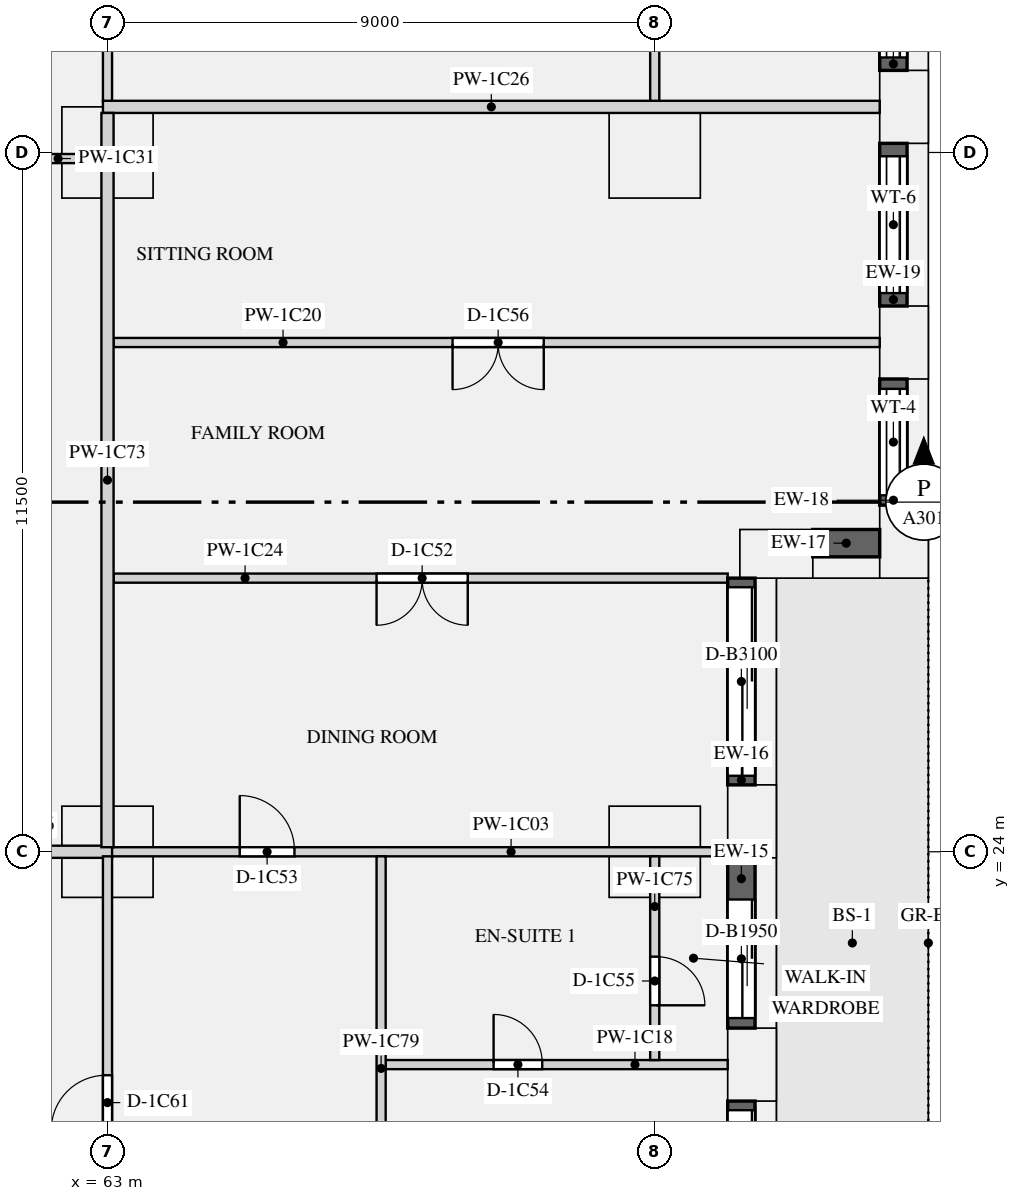
"""IFC4 building model, lengths in metres.
Left out: names, types, materials, properties, quantities, classifications, styles, units other than length and angle.
Written with IfcOpenShell. Run it as: python <this file> out.ifc"""

import sys

from ifc_helpers import new_model, si_unit, direction, frame, frame_2d, origin, origin_2d, place, context, subcontext, project, spatial, rectangle, extrude, element, fill, save


model = new_model("IFC4")
c1 = context("Model", 3, precision=1e-05, world=origin(), true_north=direction((0.0, 1.0)))
c2 = subcontext(c1, "Body", "Model", "MODEL_VIEW")
j1 = project(units=[si_unit("LENGTHUNIT", "METRE"), si_unit("PLANEANGLEUNIT", "RADIAN")], contexts=[c1])
p1 = place(None, origin())
s1 = spatial("IfcSite", under=j1, at=p1, CompositionType="ELEMENT")
p2 = place(p1, origin())
s2 = spatial("IfcBuilding", under=s1, at=p2, CompositionType="ELEMENT")
p3 = place(p2, frame((0.0, 0.0, 38.4)))
s3 = spatial("IfcBuildingStorey", under=s2, at=p3, CompositionType="ELEMENT", Elevation=38.4)
for number, where, z_axis, x_axis in (
    (1, (73.6, 20.5, 0.0), (0.0, 0.0, 1.0), (0.0, 1.0, 0.0)),
    (2, (73.6, 24.5, 0.0), (0.0, 0.0, 1.0), (0.0, 1.0, 0.0)),
    (3, (74.0, 28.9, 0.0), (0.0, 0.0, 1.0), (1.0, 0.0, 0.0)),
    (4, (76.1, 29.1, 0.0), (0.0, 0.0, 1.0), (0.0, 1.0, 0.0)),
    (5, (76.1, 32.375, 0.0), (0.0, 0.0, 1.0), (0.0, 1.0, 0.0)),
    (6, (76.1, 36.25, 0.0), (0.0, 0.0, 1.0), (0.0, 1.0, 0.0)),
):
    element("IfcColumn", number, at=place(p3, frame(where, z_axis=z_axis, x_axis=x_axis)), inside=s3, PredefinedType="USERDEFINED", context=c2, shape_type="SweptSolid", body=[
        extrude(rectangle(XDim=1.2, YDim=0.8, at=origin_2d()), origin(), (0.0, 0.0, 1.0), 3.15),
    ])
for number, where, z_axis, x_axis in (
    (7, (63.0, 24.0, 0.0), (0.0, 0.0, 1.0), (1.0, 0.0, 0.0)),
    (8, (72.0, 24.0, 0.0), (0.0, 0.0, 1.0), (1.0, 0.0, 0.0)),
    (9, (63.0, 35.5, 0.0), (0.0, 0.0, 1.0), (1.0, 0.0, 0.0)),
    (10, (72.0, 35.5, 0.0), (0.0, 0.0, 1.0), (1.0, 0.0, 0.0)),
):
    element("IfcColumn", number, at=place(p3, frame(where, z_axis=z_axis, x_axis=x_axis)), inside=s3, PredefinedType="COLUMN", context=c2, shape_type="SweptSolid", body=[
        extrude(rectangle(XDim=1.5, YDim=1.5, at=origin_2d()), origin(), (0.0, 0.0, 1.0), 3.15),
    ])
p4 = place(p3, frame((73.425, 17.1, 0.0), z_axis=(0.0, 0.0, 1.0), x_axis=(0.0, 1.0, 0.0)))
e11 = element("IfcWall", 11, at=p4, inside=s3, PredefinedType="SOLIDWALL", context=c2, shape_type="SweptSolid", body=[
    extrude(rectangle(XDim=2.8, YDim=0.45, at=frame_2d((1.4, 0.0))), origin(), (0.0, 0.0, 1.0), 2.83),
])
p5 = place(p4, frame((0.15, 0.0, 0.0)))
e12 = element("IfcOpeningElement", 12, at=p5, cuts=e11, PredefinedType="OPENING", context=c2, shape_type="SweptSolid", body=[
    extrude(rectangle(XDim=2.5, YDim=2.3, at=frame_2d((1.25, 1.15))), frame((0.0, 0.235, 0.0), z_axis=(0.0, -1.0, 0.0), x_axis=(1.0, 0.0, 0.0)), (0.0, 0.0, 1.0), 0.47),
])
p6 = place(p3, frame((73.425, 21.1, 0.0), z_axis=(0.0, 0.0, 1.0), x_axis=(0.0, 1.0, 0.0)))
e13 = element("IfcWall", 13, at=p6, inside=s3, PredefinedType="SOLIDWALL", context=c2, shape_type="SweptSolid", body=[
    extrude(rectangle(XDim=2.8, YDim=0.45, at=frame_2d((1.4, 0.0))), origin(), (0.0, 0.0, 1.0), 2.83),
])
p7 = place(p6, frame((0.165, 0.0, 0.0)))
e14 = element("IfcOpeningElement", 14, at=p7, cuts=e13, PredefinedType="OPENING", context=c2, shape_type="SweptSolid", body=[
    extrude(rectangle(XDim=1.95, YDim=2.3, at=frame_2d((0.975, 1.15))), frame((0.0, 0.235, 0.0), z_axis=(0.0, -1.0, 0.0), x_axis=(1.0, 0.0, 0.0)), (0.0, 0.0, 1.0), 0.47),
])
p8 = place(p3, frame((73.425, 25.1, 0.0), z_axis=(0.0, 0.0, 1.0), x_axis=(0.0, 1.0, 0.0)))
e15 = element("IfcWall", 15, at=p8, inside=s3, PredefinedType="SOLIDWALL", context=c2, shape_type="SweptSolid", body=[
    extrude(rectangle(XDim=3.4, YDim=0.45, at=frame_2d((1.7, 0.0))), origin(), (0.0, 0.0, 1.0), 2.83),
])
p9 = place(p8, frame((0.15, 0.0, 0.0)))
e16 = element("IfcOpeningElement", 16, at=p9, cuts=e15, PredefinedType="OPENING", context=c2, shape_type="SweptSolid", body=[
    extrude(rectangle(XDim=3.1, YDim=2.3, at=frame_2d((1.55, 1.15))), frame((0.0, 0.235, 0.0), z_axis=(0.0, -1.0, 0.0), x_axis=(1.0, 0.0, 0.0)), (0.0, 0.0, 1.0), 0.47),
])
p10 = place(p3, frame((74.6, 29.075, 0.9), z_axis=(0.0, 0.0, 1.0), x_axis=(1.0, 0.0, 0.0)))
e17 = element("IfcWall", 17, at=p10, inside=s3, PredefinedType="SOLIDWALL", context=c2, shape_type="SweptSolid", body=[
    extrude(rectangle(XDim=1.1, YDim=0.45, at=frame_2d((0.55, 0.0))), origin(), (0.0, 0.0, 1.0), 1.93),
])
p11 = place(p3, frame((75.925, 29.7, 0.9), z_axis=(0.0, 0.0, 1.0), x_axis=(0.0, 1.0, 0.0)))
e18 = element("IfcWall", 18, at=p11, inside=s3, PredefinedType="SOLIDWALL", context=c2, shape_type="SweptSolid", body=[
    extrude(rectangle(XDim=2.075, YDim=0.45, at=frame_2d((1.038, 0.0))), origin(), (0.0, 0.0, 1.0), 1.93),
])
p12 = place(p11, frame((0.163, 0.0, 0.15)))
e19 = element("IfcOpeningElement", 19, at=p12, cuts=e18, PredefinedType="OPENING", context=c2, shape_type="SweptSolid", body=[
    extrude(rectangle(XDim=1.75, YDim=1.5, at=frame_2d((0.875, 0.75))), frame((0.0, 0.235, 0.0), z_axis=(0.0, -1.0, 0.0), x_axis=(1.0, 0.0, 0.0)), (0.0, 0.0, 1.0), 0.47),
])
p13 = place(p3, frame((75.925, 32.975, 0.9), z_axis=(0.0, 0.0, 1.0), x_axis=(0.0, 1.0, 0.0)))
e20 = element("IfcWall", 20, at=p13, inside=s3, PredefinedType="SOLIDWALL", context=c2, shape_type="SweptSolid", body=[
    extrude(rectangle(XDim=2.675, YDim=0.45, at=frame_2d((1.337, 0.0))), origin(), (0.0, 0.0, 1.0), 1.93),
])
p14 = place(p13, frame((0.212, 0.0, 0.15)))
e21 = element("IfcOpeningElement", 21, at=p14, cuts=e20, PredefinedType="OPENING", context=c2, shape_type="SweptSolid", body=[
    extrude(rectangle(XDim=2.25, YDim=1.5, at=frame_2d((1.125, 0.75))), frame((0.0, 0.235, 0.0), z_axis=(0.0, -1.0, 0.0), x_axis=(1.0, 0.0, 0.0)), (0.0, 0.0, 1.0), 0.47),
])
p15 = place(p3, frame((75.925, 36.85, 0.9), z_axis=(0.0, 0.0, 1.0), x_axis=(0.0, 1.0, 0.0)))
e22 = element("IfcWall", 22, at=p15, inside=s3, PredefinedType="SOLIDWALL", context=c2, shape_type="SweptSolid", body=[
    extrude(rectangle(XDim=2.675, YDim=0.45, at=frame_2d((1.337, 0.0))), origin(), (0.0, 0.0, 1.0), 1.93),
])
p16 = place(p15, frame((0.212, 0.0, 0.15)))
e23 = element("IfcOpeningElement", 23, at=p16, cuts=e22, PredefinedType="OPENING", context=c2, shape_type="SweptSolid", body=[
    extrude(rectangle(XDim=2.25, YDim=1.5, at=frame_2d((1.125, 0.75))), frame((0.0, 0.235, 0.0), z_axis=(0.0, -1.0, 0.0), x_axis=(1.0, 0.0, 0.0)), (0.0, 0.0, 1.0), 0.47),
])
p17 = place(p3, frame((62.925, 24.0, 0.0), z_axis=(0.0, 0.0, 1.0), x_axis=(1.0, 0.0, 0.0)))
e24 = element("IfcWall", 24, at=p17, inside=s3, PredefinedType="PARTITIONING", context=c2, shape_type="SweptSolid", body=[
    extrude(rectangle(XDim=10.275, YDim=0.15, at=frame_2d((5.137, 0.0))), origin(), (0.0, 0.0, 1.0), 2.83),
])
p18 = place(p17, frame((2.25, 0.0, 0.0)))
e25 = element("IfcOpeningElement", 25, at=p18, cuts=e24, PredefinedType="OPENING", context=c2, shape_type="SweptSolid", body=[
    extrude(rectangle(XDim=0.9, YDim=2.1, at=frame_2d((0.45, 1.05))), frame((0.0, 0.085, 0.0), z_axis=(0.0, -1.0, 0.0), x_axis=(1.0, 0.0, 0.0)), (0.0, 0.0, 1.0), 0.17),
])
p19 = place(p3, frame((59.9, 24.0, 0.0), z_axis=(0.0, 0.0, 1.0), x_axis=(1.0, 0.0, 0.0)))
e26 = element("IfcWall", 26, at=p19, inside=s3, PredefinedType="PARTITIONING", context=c2, shape_type="SweptSolid", body=[
    extrude(rectangle(XDim=3.175, YDim=0.2, at=frame_2d((1.587, 0.0))), origin(), (0.0, 0.0, 1.0), 2.83),
])
p20 = place(p3, frame((67.575, 20.5, 0.0), z_axis=(0.0, 0.0, 1.0), x_axis=(1.0, 0.0, 0.0)))
e27 = element("IfcWall", 27, at=p20, inside=s3, PredefinedType="PARTITIONING", context=c2, shape_type="SweptSolid", body=[
    extrude(rectangle(XDim=5.625, YDim=0.15, at=frame_2d((2.812, 0.0))), origin(), (0.0, 0.0, 1.0), 2.83),
])
p21 = place(p20, frame((1.775, 0.0, 0.0)))
e28 = element("IfcOpeningElement", 28, at=p21, cuts=e27, PredefinedType="OPENING", context=c2, shape_type="SweptSolid", body=[
    extrude(rectangle(XDim=0.8, YDim=2.1, at=frame_2d((0.4, 1.05))), frame((0.0, 0.085, 0.0), z_axis=(0.0, -1.0, 0.0), x_axis=(1.0, 0.0, 0.0)), (0.0, 0.0, 1.0), 0.17),
])
p22 = place(p3, frame((63.1, 32.375, 0.0), z_axis=(0.0, 0.0, 1.0), x_axis=(1.0, 0.0, 0.0)))
e29 = element("IfcWall", 29, at=p22, inside=s3, PredefinedType="PARTITIONING", context=c2, shape_type="SweptSolid", body=[
    extrude(rectangle(XDim=12.6, YDim=0.15, at=frame_2d((6.3, 0.0))), origin(), (0.0, 0.0, 1.0), 2.83),
])
p23 = place(p22, frame((5.575, 0.0, 0.0)))
e30 = element("IfcOpeningElement", 30, at=p23, cuts=e29, PredefinedType="OPENING", context=c2, shape_type="SweptSolid", body=[
    extrude(rectangle(XDim=1.5, YDim=2.1, at=frame_2d((0.75, 1.05))), frame((0.0, 0.085, 0.0), z_axis=(0.0, -1.0, 0.0), x_axis=(1.0, 0.0, 0.0)), (0.0, 0.0, 1.0), 0.17),
])
p24 = place(p3, frame((63.1, 28.5, 0.0), z_axis=(0.0, 0.0, 1.0), x_axis=(1.0, 0.0, 0.0)))
e31 = element("IfcWall", 31, at=p24, inside=s3, PredefinedType="PARTITIONING", context=c2, shape_type="SweptSolid", body=[
    extrude(rectangle(XDim=10.1, YDim=0.15, at=frame_2d((5.05, 0.0))), origin(), (0.0, 0.0, 1.0), 2.83),
])
p25 = place(p24, frame((4.325, 0.0, 0.0)))
e32 = element("IfcOpeningElement", 32, at=p25, cuts=e31, PredefinedType="OPENING", context=c2, shape_type="SweptSolid", body=[
    extrude(rectangle(XDim=1.5, YDim=2.1, at=frame_2d((0.75, 1.05))), frame((0.0, 0.085, 0.0), z_axis=(0.0, -1.0, 0.0), x_axis=(1.0, 0.0, 0.0)), (0.0, 0.0, 1.0), 0.17),
])
p26 = place(p3, frame((62.925, 36.25, 0.0), z_axis=(0.0, 0.0, 1.0), x_axis=(1.0, 0.0, 0.0)))
e33 = element("IfcWall", 33, at=p26, inside=s3, PredefinedType="PARTITIONING", context=c2, shape_type="SweptSolid", body=[
    extrude(rectangle(XDim=12.775, YDim=0.2, at=frame_2d((6.387, 0.0))), origin(), (0.0, 0.0, 1.0), 2.83),
])
p27 = place(p3, frame((59.8, 35.4, 0.0), z_axis=(0.0, 0.0, 1.0), x_axis=(1.0, 0.0, 0.0)))
e34 = element("IfcWall", 34, at=p27, inside=s3, PredefinedType="PARTITIONING", context=c2, shape_type="SweptSolid", body=[
    extrude(rectangle(XDim=3.1, YDim=0.15, at=frame_2d((1.55, 0.0))), origin(), (0.0, 0.0, 1.0), 2.83),
])
p28 = place(p27, frame((0.775, 0.0, 0.0)))
e35 = element("IfcOpeningElement", 35, at=p28, cuts=e34, PredefinedType="OPENING", context=c2, shape_type="SweptSolid", body=[
    extrude(rectangle(XDim=0.9, YDim=2.1, at=frame_2d((0.45, 1.05))), frame((0.0, 0.085, 0.0), z_axis=(0.0, -1.0, 0.0), x_axis=(1.0, 0.0, 0.0)), (0.0, 0.0, 1.0), 0.17),
])
p29 = place(p3, frame((63.0, 12.575, 0.0), z_axis=(0.0, 0.0, 1.0), x_axis=(0.0, 1.0, 0.0)))
e36 = element("IfcWall", 36, at=p29, inside=s3, PredefinedType="PARTITIONING", context=c2, shape_type="SweptSolid", body=[
    extrude(rectangle(XDim=11.35, YDim=0.15, at=frame_2d((5.675, 0.0))), origin(), (0.0, 0.0, 1.0), 2.83),
])
p30 = place(p29, frame((6.85, 0.0, 0.0)))
e37 = element("IfcOpeningElement", 37, at=p30, cuts=e36, PredefinedType="OPENING", context=c2, shape_type="SweptSolid", body=[
    extrude(rectangle(XDim=0.9, YDim=2.1, at=frame_2d((0.45, 1.05))), frame((0.0, 0.085, 0.0), z_axis=(0.0, -1.0, 0.0), x_axis=(1.0, 0.0, 0.0)), (0.0, 0.0, 1.0), 0.17),
])
p31 = place(p3, frame((63.0, 36.35, 0.0), z_axis=(0.0, 0.0, 1.0), x_axis=(0.0, 1.0, 0.0)))
e38 = element("IfcWall", 38, at=p31, inside=s3, PredefinedType="PARTITIONING", context=c2, shape_type="SweptSolid", body=[
    extrude(rectangle(XDim=3.7, YDim=0.15, at=frame_2d((1.85, 0.0))), origin(), (0.0, 0.0, 1.0), 2.83),
])
p32 = place(p3, frame((63.0, 24.075, 0.0), z_axis=(0.0, 0.0, 1.0), x_axis=(0.0, 1.0, 0.0)))
e39 = element("IfcWall", 39, at=p32, inside=s3, PredefinedType="PARTITIONING", context=c2, shape_type="SweptSolid", body=[
    extrude(rectangle(XDim=12.075, YDim=0.2, at=frame_2d((6.038, 0.0))), origin(), (0.0, 0.0, 1.0), 2.83),
])
p33 = place(p3, frame((72.0, 20.575, 0.0), z_axis=(0.0, 0.0, 1.0), x_axis=(0.0, 1.0, 0.0)))
e40 = element("IfcWall", 40, at=p33, inside=s3, PredefinedType="PARTITIONING", context=c2, shape_type="SweptSolid", body=[
    extrude(rectangle(XDim=3.35, YDim=0.15, at=frame_2d((1.675, 0.0))), origin(), (0.0, 0.0, 1.0), 2.83),
])
p34 = place(p33, frame((0.9, 0.0, 0.0)))
e41 = element("IfcOpeningElement", 41, at=p34, cuts=e40, PredefinedType="OPENING", context=c2, shape_type="SweptSolid", body=[
    extrude(rectangle(XDim=0.8, YDim=2.1, at=frame_2d((0.4, 1.05))), frame((0.0, 0.085, 0.0), z_axis=(0.0, -1.0, 0.0), x_axis=(1.0, 0.0, 0.0)), (0.0, 0.0, 1.0), 0.17),
])
p35 = place(p3, frame((72.0, 36.35, 0.0), z_axis=(0.0, 0.0, 1.0), x_axis=(0.0, 1.0, 0.0)))
e42 = element("IfcWall", 42, at=p35, inside=s3, PredefinedType="PARTITIONING", context=c2, shape_type="SweptSolid", body=[
    extrude(rectangle(XDim=3.7, YDim=0.15, at=frame_2d((1.85, 0.0))), origin(), (0.0, 0.0, 1.0), 2.83),
])
p36 = place(p35, frame((1.088, 0.0, 0.0)))
e43 = element("IfcOpeningElement", 43, at=p36, cuts=e42, PredefinedType="OPENING", context=c2, shape_type="SweptSolid", body=[
    extrude(rectangle(XDim=1.5, YDim=2.1, at=frame_2d((0.75, 1.05))), frame((0.0, 0.085, 0.0), z_axis=(0.0, -1.0, 0.0), x_axis=(1.0, 0.0, 0.0)), (0.0, 0.0, 1.0), 0.17),
])
p37 = place(p3, frame((67.5, 8.575, 0.0), z_axis=(0.0, 0.0, 1.0), x_axis=(0.0, 1.0, 0.0)))
e44 = element("IfcWall", 44, at=p37, inside=s3, PredefinedType="PARTITIONING", context=c2, shape_type="SweptSolid", body=[
    extrude(rectangle(XDim=15.35, YDim=0.15, at=frame_2d((7.675, 0.0))), origin(), (0.0, 0.0, 1.0), 2.83),
])
p38 = place(p37, frame((7.475, 0.0, 0.0)))
e45 = element("IfcOpeningElement", 45, at=p38, cuts=e44, PredefinedType="OPENING", context=c2, shape_type="SweptSolid", body=[
    extrude(rectangle(XDim=0.9, YDim=2.1, at=frame_2d((0.45, 1.05))), frame((0.0, 0.085, 0.0), z_axis=(0.0, -1.0, 0.0), x_axis=(1.0, 0.0, 0.0)), (0.0, 0.0, 1.0), 0.17),
])
p39 = place(p37, frame((1.475, 0.0, 0.0)))
e46 = element("IfcOpeningElement", 46, at=p39, cuts=e44, PredefinedType="OPENING", context=c2, shape_type="SweptSolid", body=[
    extrude(rectangle(XDim=0.9, YDim=2.1, at=frame_2d((0.45, 1.05))), frame((0.0, 0.085, 0.0), z_axis=(0.0, -1.0, 0.0), x_axis=(1.0, 0.0, 0.0)), (0.0, 0.0, 1.0), 0.17),
])
p40 = place(p5, origin())
e47 = element("IfcDoor", 47, at=p40, inside=s3, OperationType="SLIDING_TO_LEFT", PredefinedType="DOOR", context=c2, shape_type="SweptSolid", body=[
    extrude(rectangle(XDim=2.5, YDim=2.3, at=frame_2d((1.25, 1.15))), frame((0.0, -0.07, 0.0), z_axis=(0.0, -1.0, 0.0), x_axis=(1.0, 0.0, 0.0)), (0.0, 0.0, 1.0), 0.05),
])
fill(e12, e47)
p41 = place(p7, origin())
e48 = element("IfcDoor", 48, at=p41, inside=s3, OperationType="SLIDING_TO_LEFT", PredefinedType="DOOR", context=c2, shape_type="SweptSolid", body=[
    extrude(rectangle(XDim=1.95, YDim=2.3, at=frame_2d((0.975, 1.15))), frame((0.0, -0.07, 0.0), z_axis=(0.0, -1.0, 0.0), x_axis=(1.0, 0.0, 0.0)), (0.0, 0.0, 1.0), 0.05),
])
fill(e14, e48)
p42 = place(p9, origin())
e49 = element("IfcDoor", 49, at=p42, inside=s3, OperationType="SLIDING_TO_LEFT", PredefinedType="DOOR", context=c2, shape_type="SweptSolid", body=[
    extrude(rectangle(XDim=3.1, YDim=2.3, at=frame_2d((1.55, 1.15))), frame((0.0, -0.07, 0.0), z_axis=(0.0, -1.0, 0.0), x_axis=(1.0, 0.0, 0.0)), (0.0, 0.0, 1.0), 0.05),
])
fill(e16, e49)
p43 = place(p12, origin())
e50 = element("IfcWindow", 50, at=p43, inside=s3, PartitioningType="SINGLE_PANEL", PredefinedType="WINDOW", context=c2, shape_type="SweptSolid", body=[
    extrude(rectangle(XDim=1.75, YDim=1.5, at=frame_2d((0.875, 0.75))), frame((0.0, -0.065, 0.0), z_axis=(0.0, -1.0, 0.0), x_axis=(1.0, 0.0, 0.0)), (0.0, 0.0, 1.0), 0.06),
])
fill(e19, e50)
p44 = place(p14, origin())
e51 = element("IfcWindow", 51, at=p44, inside=s3, PartitioningType="SINGLE_PANEL", PredefinedType="WINDOW", context=c2, shape_type="SweptSolid", body=[
    extrude(rectangle(XDim=2.25, YDim=1.5, at=frame_2d((1.125, 0.75))), frame((0.0, -0.065, 0.0), z_axis=(0.0, -1.0, 0.0), x_axis=(1.0, 0.0, 0.0)), (0.0, 0.0, 1.0), 0.06),
])
fill(e21, e51)
p45 = place(p16, origin())
e52 = element("IfcWindow", 52, at=p45, inside=s3, PartitioningType="SINGLE_PANEL", PredefinedType="WINDOW", context=c2, shape_type="SweptSolid", body=[
    extrude(rectangle(XDim=2.25, YDim=1.5, at=frame_2d((1.125, 0.75))), frame((0.0, -0.065, 0.0), z_axis=(0.0, -1.0, 0.0), x_axis=(1.0, 0.0, 0.0)), (0.0, 0.0, 1.0), 0.06),
])
fill(e23, e52)
p46 = place(p25, frame((1.5, 0.0, 0.0), z_axis=(0.0, 0.0, 1.0), x_axis=(-1.0, 0.0, 0.0)))
e53 = element("IfcDoor", 53, at=p46, inside=s3, OperationType="DOUBLE_DOOR_SINGLE_SWING", PredefinedType="DOOR", context=c2, shape_type="SweptSolid", body=[
    extrude(rectangle(XDim=1.5, YDim=2.1, at=frame_2d((0.75, 1.05))), frame((0.0, 0.025, 0.0), z_axis=(0.0, -1.0, 0.0), x_axis=(1.0, 0.0, 0.0)), (0.0, 0.0, 1.0), 0.05),
])
fill(e32, e53)
p47 = place(p18, origin())
e54 = element("IfcDoor", 54, at=p47, inside=s3, OperationType="SINGLE_SWING_LEFT", PredefinedType="DOOR", context=c2, shape_type="SweptSolid", body=[
    extrude(rectangle(XDim=0.9, YDim=2.1, at=frame_2d((0.45, 1.05))), frame((0.0, 0.025, 0.0), z_axis=(0.0, -1.0, 0.0), x_axis=(1.0, 0.0, 0.0)), (0.0, 0.0, 1.0), 0.05),
])
fill(e25, e54)
p48 = place(p21, origin())
e55 = element("IfcDoor", 55, at=p48, inside=s3, OperationType="SINGLE_SWING_LEFT", PredefinedType="DOOR", context=c2, shape_type="SweptSolid", body=[
    extrude(rectangle(XDim=0.8, YDim=2.1, at=frame_2d((0.4, 1.05))), frame((0.0, 0.025, 0.0), z_axis=(0.0, -1.0, 0.0), x_axis=(1.0, 0.0, 0.0)), (0.0, 0.0, 1.0), 0.05),
])
fill(e28, e55)
p49 = place(p34, frame((0.8, 0.0, 0.0), z_axis=(0.0, 0.0, 1.0), x_axis=(-1.0, 0.0, 0.0)))
e56 = element("IfcDoor", 56, at=p49, inside=s3, OperationType="SINGLE_SWING_RIGHT", PredefinedType="DOOR", context=c2, shape_type="SweptSolid", body=[
    extrude(rectangle(XDim=0.8, YDim=2.1, at=frame_2d((0.4, 1.05))), frame((0.0, 0.025, 0.0), z_axis=(0.0, -1.0, 0.0), x_axis=(1.0, 0.0, 0.0)), (0.0, 0.0, 1.0), 0.05),
])
fill(e41, e56)
p50 = place(p23, frame((1.5, 0.0, 0.0), z_axis=(0.0, 0.0, 1.0), x_axis=(-1.0, 0.0, 0.0)))
e57 = element("IfcDoor", 57, at=p50, inside=s3, OperationType="DOUBLE_DOOR_SINGLE_SWING", PredefinedType="DOOR", context=c2, shape_type="SweptSolid", body=[
    extrude(rectangle(XDim=1.5, YDim=2.1, at=frame_2d((0.75, 1.05))), frame((0.0, 0.025, 0.0), z_axis=(0.0, -1.0, 0.0), x_axis=(1.0, 0.0, 0.0)), (0.0, 0.0, 1.0), 0.05),
])
fill(e30, e57)
p51 = place(p30, origin())
e58 = element("IfcDoor", 58, at=p51, inside=s3, OperationType="SINGLE_SWING_LEFT", PredefinedType="DOOR", context=c2, shape_type="SweptSolid", body=[
    extrude(rectangle(XDim=0.9, YDim=2.1, at=frame_2d((0.45, 1.05))), frame((0.0, 0.025, 0.0), z_axis=(0.0, -1.0, 0.0), x_axis=(1.0, 0.0, 0.0)), (0.0, 0.0, 1.0), 0.05),
])
fill(e37, e58)
save(model, sys.argv[1])
